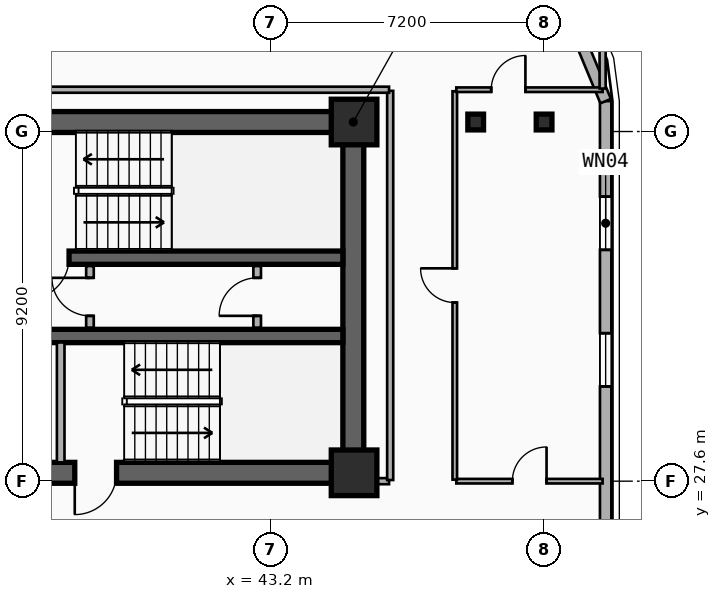
"""IFC4 building model, lengths in metres.
Left out: names, types, materials, properties, quantities, classifications, styles, units other than length and angle.
Written with IfcOpenShell. Run it as: python <this file> out.ifc"""

import sys

from ifc_helpers import new_model, si_unit, direction, frame, frame_2d, origin, origin_2d, place, context, subcontext, project, spatial, rectangle, i_section, extrude, element, fill, save


model = new_model("IFC4")
c1 = context("Model", 3, precision=1e-05, world=origin(), true_north=direction((0.0, 1.0)))
c2 = subcontext(c1, "Body", "Model", "MODEL_VIEW")
j1 = project(units=[si_unit("LENGTHUNIT", "METRE"), si_unit("PLANEANGLEUNIT", "RADIAN")], contexts=[c1])
p1 = place(None, origin())
s1 = spatial("IfcSite", under=j1, at=p1, CompositionType="ELEMENT")
p2 = place(p1, origin())
s2 = spatial("IfcBuilding", under=s1, at=p2, CompositionType="ELEMENT")
p3 = place(p2, frame((0.0, 0.0, 162.55)))
s3 = spatial("IfcBuildingStorey", under=s2, at=p3, CompositionType="ELEMENT", Elevation=162.55)
p4 = place(p3, frame((12.15, 37.05, 0.0), z_axis=(0.0, 0.0, 1.0), x_axis=(1.0, 0.0, 0.0)))
e1 = element("IfcWall", 1, at=p4, inside=s3, PredefinedType="SHEAR", context=c2, shape_type="SweptSolid", body=[
    extrude(rectangle(XDim=33.23, YDim=0.55, at=frame_2d((16.615, 0.0))), origin(), (0.0, 0.0, 1.0), 3.55),
])
p5 = place(p3, frame((45.38, 27.82, 0.0), z_axis=(0.0, 0.0, 1.0), x_axis=(-1.0, 0.0, 0.0)))
e2 = element("IfcWall", 2, at=p5, inside=s3, PredefinedType="SHEAR", context=c2, shape_type="SweptSolid", body=[
    extrude(rectangle(XDim=12.23, YDim=0.55, at=frame_2d((6.115, 0.0))), origin(), (0.0, 0.0, 1.0), 3.55),
])
p6 = place(p5, frame((9.93, 0.0, 0.0)))
e3 = element("IfcOpeningElement", 3, at=p6, cuts=e2, PredefinedType="OPENING", context=c2, shape_type="SweptSolid", body=[
    extrude(rectangle(XDim=1.1, YDim=2.15, at=frame_2d((0.55, 1.075))), frame((0.0, 0.285, 0.0), z_axis=(0.0, -1.0, 0.0), x_axis=(1.0, 0.0, 0.0)), (0.0, 0.0, 1.0), 0.57),
])
p7 = place(p5, frame((6.23, 0.0, 0.0)))
e4 = element("IfcOpeningElement", 4, at=p7, cuts=e2, PredefinedType="OPENING", context=c2, shape_type="SweptSolid", body=[
    extrude(rectangle(XDim=1.1, YDim=2.15, at=frame_2d((0.55, 1.075))), frame((0.0, 0.285, 0.0), z_axis=(0.0, -1.0, 0.0), x_axis=(1.0, 0.0, 0.0)), (0.0, 0.0, 1.0), 0.57),
])
p8 = place(p3, frame((45.38, 28.095, 0.0), z_axis=(0.0, 0.0, 1.0), x_axis=(0.0, 1.0, 0.0)))
e5 = element("IfcWall", 5, at=p8, inside=s3, PredefinedType="SHEAR", context=c2, shape_type="SweptSolid", body=[
    extrude(rectangle(XDim=8.68, YDim=0.55, at=frame_2d((4.34, 0.0))), origin(), (0.0, 0.0, 1.0), 3.55),
])
p9 = place(p3, frame((45.105, 33.48, 0.0), z_axis=(0.0, 0.0, 1.0), x_axis=(-1.0, 0.0, 0.0)))
e6 = element("IfcWall", 6, at=p9, inside=s3, PredefinedType="SHEAR", context=c2, shape_type="SweptSolid", body=[
    extrude(rectangle(XDim=8.55, YDim=0.35, at=frame_2d((4.275, 0.0))), origin(), (0.0, 0.0, 1.0), 3.55),
])
p10 = place(p9, frame((7.205, 0.0, 0.0)))
e7 = element("IfcOpeningElement", 7, at=p10, cuts=e6, PredefinedType="OPENING", context=c2, shape_type="SweptSolid", body=[
    extrude(rectangle(XDim=1.1, YDim=2.15, at=frame_2d((0.55, 1.075))), frame((0.0, 0.185, 0.0), z_axis=(0.0, -1.0, 0.0), x_axis=(1.0, 0.0, 0.0)), (0.0, 0.0, 1.0), 0.37),
])
p11 = place(p3, frame((36.555, 31.42, 0.0), z_axis=(0.0, 0.0, 1.0), x_axis=(1.0, 0.0, 0.0)))
e8 = element("IfcWall", 8, at=p11, inside=s3, PredefinedType="SHEAR", context=c2, shape_type="SweptSolid", body=[
    extrude(rectangle(XDim=8.55, YDim=0.35, at=frame_2d((4.275, 0.0))), origin(), (0.0, 0.0, 1.0), 3.55),
])
for number, where, z_axis, x_axis in (
    (9, (45.4, 27.82, 0.0), (0.0, 0.0, 1.0), (1.0, 0.0, 0.0)),
    (10, (45.4, 37.05, 0.0), (0.0, 0.0, 1.0), (1.0, 0.0, 0.0)),
):
    element("IfcColumn", number, at=place(p3, frame(where, z_axis=z_axis, x_axis=x_axis)), inside=s3, PredefinedType="COLUMN", context=c2, shape_type="SweptSolid", body=[
        extrude(rectangle(XDim=1.2, YDim=1.2, at=origin_2d()), origin(), (0.0, 0.0, 1.0), 3.55),
    ])
for number, where, z_axis, x_axis in (
    (11, (48.6, 37.05, 0.0), (0.0, 0.0, 1.0), (1.0, 0.0, 0.0)),
    (12, (50.4, 37.05, 0.0), (0.0, 0.0, 1.0), (1.0, 0.0, 0.0)),
):
    element("IfcColumn", number, at=place(p3, frame(where, z_axis=z_axis, x_axis=x_axis)), inside=s3, PredefinedType="COLUMN", context=c2, shape_type="SweptSolid", body=[
        extrude(i_section(OverallWidth=0.413, OverallDepth=0.415, WebThickness=0.03, FlangeThickness=0.047, FilletRadius=0.015, at=origin_2d()), origin(), (0.0, 0.0, 1.0), 3.55),
    ])
p12 = place(p3, frame((52.02, 37.6, 0.0), z_axis=(0.0, 0.0, 1.0), x_axis=(0.0, -1.0, 0.0)))
e13 = element("IfcWall", 13, at=p12, inside=s3, PredefinedType="SOLIDWALL", context=c2, shape_type="SweptSolid", body=[
    extrude(rectangle(XDim=23.0, YDim=0.3, at=frame_2d((11.5, 0.0))), origin(), (0.0, 0.0, 1.0), 3.29),
])
p13 = place(p12, frame((2.513, 0.0, 0.34)))
e14 = element("IfcOpeningElement", 14, at=p13, cuts=e13, PredefinedType="OPENING", context=c2, shape_type="SweptSolid", body=[
    extrude(rectangle(XDim=1.4, YDim=2.1, at=frame_2d((0.7, 1.05))), frame((0.0, 0.16, 0.0), z_axis=(0.0, -1.0, 0.0), x_axis=(1.0, 0.0, 0.0)), (0.0, 0.0, 1.0), 0.32),
])
p14 = place(p12, frame((6.107, 0.0, 0.34)))
e15 = element("IfcOpeningElement", 15, at=p14, cuts=e13, PredefinedType="OPENING", context=c2, shape_type="SweptSolid", body=[
    extrude(rectangle(XDim=1.4, YDim=2.1, at=frame_2d((0.7, 1.05))), frame((0.0, 0.16, 0.0), z_axis=(0.0, -1.0, 0.0), x_axis=(1.0, 0.0, 0.0)), (0.0, 0.0, 1.0), 0.32),
])
p15 = place(p12, frame((21.431, 0.0, 0.68)))
e16 = element("IfcOpeningElement", 16, at=p15, cuts=e13, PredefinedType="OPENING", context=c2, shape_type="SweptSolid", body=[
    extrude(rectangle(XDim=1.2, YDim=1.5, at=frame_2d((0.6, 0.75))), frame((0.0, 0.16, 0.0), z_axis=(0.0, -1.0, 0.0), x_axis=(1.0, 0.0, 0.0)), (0.0, 0.0, 1.0), 0.32),
])
p16 = place(p12, frame((17.073, 0.0, 0.34)))
e17 = element("IfcOpeningElement", 17, at=p16, cuts=e13, PredefinedType="OPENING", context=c2, shape_type="SweptSolid", body=[
    extrude(rectangle(XDim=1.4, YDim=2.1, at=frame_2d((0.7, 1.05))), frame((0.0, 0.16, 0.0), z_axis=(0.0, -1.0, 0.0), x_axis=(1.0, 0.0, 0.0)), (0.0, 0.0, 1.0), 0.32),
])
p17 = place(p12, frame((18.928, 0.0, 0.34)))
e18 = element("IfcOpeningElement", 18, at=p17, cuts=e13, PredefinedType="OPENING", context=c2, shape_type="SweptSolid", body=[
    extrude(rectangle(XDim=1.4, YDim=2.1, at=frame_2d((0.7, 1.05))), frame((0.0, 0.16, 0.0), z_axis=(0.0, -1.0, 0.0), x_axis=(1.0, 0.0, 0.0)), (0.0, 0.0, 1.0), 0.32),
])
p18 = place(p12, frame((13.484, 0.0, 0.34)))
e19 = element("IfcOpeningElement", 19, at=p18, cuts=e13, PredefinedType="OPENING", context=c2, shape_type="SweptSolid", body=[
    extrude(rectangle(XDim=1.4, YDim=2.1, at=frame_2d((0.7, 1.05))), frame((0.0, 0.16, 0.0), z_axis=(0.0, -1.0, 0.0), x_axis=(1.0, 0.0, 0.0)), (0.0, 0.0, 1.0), 0.32),
])
p19 = place(p3, frame((50.843, 40.443, 0.0), z_axis=(0.0, 0.0, 1.0), x_axis=(0.382704529509, -0.923870793506, 0.0)))
e20 = element("IfcWall", 20, at=p19, inside=s3, PredefinedType="SOLIDWALL", context=c2, shape_type="SweptSolid", body=[
    extrude(rectangle(XDim=3.077, YDim=0.3, at=frame_2d((1.538, 0.0))), origin(), (0.0, 0.0, 1.0), 3.29),
])
p20 = place(p3, frame((37.68, 28.095, 0.0), z_axis=(0.0, 0.0, 1.0), x_axis=(0.0, 1.0, 0.0)))
e21 = element("IfcWall", 21, at=p20, inside=s3, PredefinedType="PARTITIONING", context=c2, shape_type="SweptSolid", body=[
    extrude(rectangle(XDim=3.155, YDim=0.2, at=frame_2d((1.578, 0.0))), origin(), (0.0, 0.0, 1.0), 2.67),
])
p21 = place(p3, frame((38.45, 31.64, 0.0), z_axis=(0.0, 0.0, 1.0), x_axis=(0.0, 1.0, 0.0)))
e22 = element("IfcWall", 22, at=p21, inside=s3, PredefinedType="PARTITIONING", context=c2, shape_type="SweptSolid", body=[
    extrude(rectangle(XDim=1.62, YDim=0.2, at=frame_2d((0.81, 0.0))), origin(), (0.0, 0.0, 1.0), 3.29),
])
p22 = place(p21, frame((0.31, 0.0, 0.0)))
e23 = element("IfcOpeningElement", 23, at=p22, cuts=e22, PredefinedType="OPENING", context=c2, shape_type="SweptSolid", body=[
    extrude(rectangle(XDim=1.0, YDim=2.15, at=frame_2d((0.5, 1.075))), frame((0.0, 0.11, 0.0), z_axis=(0.0, -1.0, 0.0), x_axis=(1.0, 0.0, 0.0)), (0.0, 0.0, 1.0), 0.22),
])
p23 = place(p3, frame((42.85, 31.64, 0.0), z_axis=(0.0, 0.0, 1.0), x_axis=(0.0, 1.0, 0.0)))
e24 = element("IfcWall", 24, at=p23, inside=s3, PredefinedType="PARTITIONING", context=c2, shape_type="SweptSolid", body=[
    extrude(rectangle(XDim=1.62, YDim=0.2, at=frame_2d((0.81, 0.0))), origin(), (0.0, 0.0, 1.0), 3.29),
])
p24 = place(p23, frame((0.31, 0.0, 0.0)))
e25 = element("IfcOpeningElement", 25, at=p24, cuts=e24, PredefinedType="OPENING", context=c2, shape_type="SweptSolid", body=[
    extrude(rectangle(XDim=1.0, YDim=2.15, at=frame_2d((0.5, 1.075))), frame((0.0, 0.11, 0.0), z_axis=(0.0, -1.0, 0.0), x_axis=(1.0, 0.0, 0.0)), (0.0, 0.0, 1.0), 0.22),
])
p25 = place(p3, frame((48.09, 27.6, 0.0), z_axis=(0.0, 0.0, 1.0), x_axis=(1.0, 0.0, 0.0)))
e26 = element("IfcWall", 26, at=p25, inside=s3, PredefinedType="PARTITIONING", context=c2, shape_type="SweptSolid", body=[
    extrude(rectangle(XDim=3.85, YDim=0.12, at=frame_2d((1.925, 0.0))), origin(), (0.0, 0.0, 1.0), 2.62),
])
p26 = place(p25, frame((1.475, 0.0, 0.0)))
e27 = element("IfcOpeningElement", 27, at=p26, cuts=e26, PredefinedType="OPENING", context=c2, shape_type="SweptSolid", body=[
    extrude(rectangle(XDim=0.9, YDim=2.1, at=frame_2d((0.45, 1.05))), frame((0.0, 0.07, 0.0), z_axis=(0.0, -1.0, 0.0), x_axis=(1.0, 0.0, 0.0)), (0.0, 0.0, 1.0), 0.14),
])
p27 = place(p3, frame((48.05, 27.64, 0.0), z_axis=(0.0, 0.0, 1.0), x_axis=(0.0, 1.0, 0.0)))
e28 = element("IfcWall", 28, at=p27, inside=s3, PredefinedType="PARTITIONING", context=c2, shape_type="SweptSolid", body=[
    extrude(rectangle(XDim=10.22, YDim=0.12, at=frame_2d((5.11, 0.0))), origin(), (0.0, 0.0, 1.0), 2.77),
])
p28 = place(p27, frame((4.66, 0.0, 0.0)))
e29 = element("IfcOpeningElement", 29, at=p28, cuts=e28, PredefinedType="OPENING", context=c2, shape_type="SweptSolid", body=[
    extrude(rectangle(XDim=0.9, YDim=2.1, at=frame_2d((0.45, 1.05))), frame((0.0, 0.07, 0.0), z_axis=(0.0, -1.0, 0.0), x_axis=(1.0, 0.0, 0.0)), (0.0, 0.0, 1.0), 0.14),
])
p29 = place(p3, frame((48.09, 37.9, 0.0), z_axis=(0.0, 0.0, 1.0), x_axis=(1.0, 0.0, 0.0)))
e30 = element("IfcWall", 30, at=p29, inside=s3, PredefinedType="PARTITIONING", context=c2, shape_type="SweptSolid", body=[
    extrude(rectangle(XDim=3.85, YDim=0.12, at=frame_2d((1.925, 0.0))), origin(), (0.0, 0.0, 1.0), 3.29),
])
p30 = place(p29, frame((0.919, 0.0, 0.0)))
e31 = element("IfcOpeningElement", 31, at=p30, cuts=e30, PredefinedType="OPENING", context=c2, shape_type="SweptSolid", body=[
    extrude(rectangle(XDim=0.9, YDim=2.1, at=frame_2d((0.45, 1.05))), frame((0.0, 0.07, 0.0), z_axis=(0.0, -1.0, 0.0), x_axis=(1.0, 0.0, 0.0)), (0.0, 0.0, 1.0), 0.14),
])
p31 = place(p3, frame((45.41, 27.6, 0.0), z_axis=(0.0, 0.0, 1.0), x_axis=(1.0, 0.0, 0.0)))
e32 = element("IfcWall", 32, at=p31, inside=s3, PredefinedType="PARTITIONING", context=c2, shape_type="SweptSolid", body=[
    extrude(rectangle(XDim=0.91, YDim=0.16, at=frame_2d((0.455, 0.0))), origin(), (0.0, 0.0, 1.0), 2.36),
])
p32 = place(p3, frame((46.35, 27.63, 0.0), z_axis=(0.0, 0.0, 1.0), x_axis=(0.0, 1.0, 0.0)))
e33 = element("IfcWall", 33, at=p32, inside=s3, PredefinedType="PARTITIONING", context=c2, shape_type="SweptSolid", body=[
    extrude(rectangle(XDim=10.24, YDim=0.16, at=frame_2d((5.12, 0.0))), origin(), (0.0, 0.0, 1.0), 2.77),
])
p33 = place(p3, frame((11.28, 37.9, 0.0), z_axis=(0.0, 0.0, 1.0), x_axis=(1.0, 0.0, 0.0)))
e34 = element("IfcWall", 34, at=p33, inside=s3, PredefinedType="PARTITIONING", context=c2, shape_type="SweptSolid", body=[
    extrude(rectangle(XDim=35.04, YDim=0.16, at=frame_2d((17.52, 0.0))), origin(), (0.0, 0.0, 1.0), 3.29),
])
p34 = place(p3, frame((51.94, 37.93, 0.0), z_axis=(0.0, 0.0, 1.0), x_axis=(0.0, 1.0, 0.0)))
e35 = element("IfcWall", 35, at=p34, inside=s3, PredefinedType="PARTITIONING", context=c2, shape_type="SweptSolid", body=[
    extrude(rectangle(XDim=1.44, YDim=0.16, at=frame_2d((0.72, 0.0))), origin(), (0.0, 0.0, 1.0), 3.29),
])
p35 = place(p13, origin())
e36 = element("IfcWindow", 36, at=p35, inside=s3, PartitioningType="SINGLE_PANEL", PredefinedType="WINDOW", context=c2, shape_type="SweptSolid", body=[
    extrude(rectangle(XDim=1.4, YDim=2.1, at=frame_2d((0.7, 1.05))), frame((0.0, 0.03, 0.0), z_axis=(0.0, -1.0, 0.0), x_axis=(1.0, 0.0, 0.0)), (0.0, 0.0, 1.0), 0.06),
])
fill(e14, e36)
p36 = place(p14, origin())
e37 = element("IfcWindow", 37, at=p36, inside=s3, PartitioningType="SINGLE_PANEL", PredefinedType="WINDOW", context=c2, shape_type="SweptSolid", body=[
    extrude(rectangle(XDim=1.4, YDim=2.1, at=frame_2d((0.7, 1.05))), frame((0.0, 0.03, 0.0), z_axis=(0.0, -1.0, 0.0), x_axis=(1.0, 0.0, 0.0)), (0.0, 0.0, 1.0), 0.06),
])
fill(e15, e37)
p37 = place(p10, origin())
e38 = element("IfcDoor", 38, at=p37, inside=s3, OperationType="SINGLE_SWING_RIGHT", PredefinedType="DOOR", context=c2, shape_type="SweptSolid", body=[
    extrude(rectangle(XDim=1.1, YDim=2.15, at=frame_2d((0.55, 1.075))), frame((0.0, 0.025, 0.0), z_axis=(0.0, -1.0, 0.0), x_axis=(1.0, 0.0, 0.0)), (0.0, 0.0, 1.0), 0.05),
])
fill(e7, e38)
p38 = place(p7, origin())
e39 = element("IfcDoor", 39, at=p38, inside=s3, OperationType="SINGLE_SWING_RIGHT", PredefinedType="DOOR", context=c2, shape_type="SweptSolid", body=[
    extrude(rectangle(XDim=1.1, YDim=2.15, at=frame_2d((0.55, 1.075))), frame((0.0, 0.025, 0.0), z_axis=(0.0, -1.0, 0.0), x_axis=(1.0, 0.0, 0.0)), (0.0, 0.0, 1.0), 0.05),
])
fill(e4, e39)
p39 = place(p22, origin())
e40 = element("IfcDoor", 40, at=p39, inside=s3, OperationType="SINGLE_SWING_RIGHT", PredefinedType="DOOR", context=c2, shape_type="SweptSolid", body=[
    extrude(rectangle(XDim=1.0, YDim=2.15, at=frame_2d((0.5, 1.075))), frame((0.0, 0.025, 0.0), z_axis=(0.0, -1.0, 0.0), x_axis=(1.0, 0.0, 0.0)), (0.0, 0.0, 1.0), 0.05),
])
fill(e23, e40)
p40 = place(p24, origin())
e41 = element("IfcDoor", 41, at=p40, inside=s3, OperationType="SINGLE_SWING_LEFT", PredefinedType="DOOR", context=c2, shape_type="SweptSolid", body=[
    extrude(rectangle(XDim=1.0, YDim=2.15, at=frame_2d((0.5, 1.075))), frame((0.0, 0.025, 0.0), z_axis=(0.0, -1.0, 0.0), x_axis=(1.0, 0.0, 0.0)), (0.0, 0.0, 1.0), 0.05),
])
fill(e25, e41)
p41 = place(p26, origin())
e42 = element("IfcDoor", 42, at=p41, inside=s3, OperationType="SINGLE_SWING_RIGHT", PredefinedType="DOOR", context=c2, shape_type="SweptSolid", body=[
    extrude(rectangle(XDim=0.9, YDim=2.1, at=frame_2d((0.45, 1.05))), frame((0.0, 0.025, 0.0), z_axis=(0.0, -1.0, 0.0), x_axis=(1.0, 0.0, 0.0)), (0.0, 0.0, 1.0), 0.05),
])
fill(e27, e42)
p42 = place(p28, origin())
e43 = element("IfcDoor", 43, at=p42, inside=s3, OperationType="SINGLE_SWING_RIGHT", PredefinedType="DOOR", context=c2, shape_type="SweptSolid", body=[
    extrude(rectangle(XDim=0.9, YDim=2.1, at=frame_2d((0.45, 1.05))), frame((0.0, 0.025, 0.0), z_axis=(0.0, -1.0, 0.0), x_axis=(1.0, 0.0, 0.0)), (0.0, 0.0, 1.0), 0.05),
])
fill(e29, e43)
p43 = place(p30, origin())
e44 = element("IfcDoor", 44, at=p43, inside=s3, OperationType="SINGLE_SWING_RIGHT", PredefinedType="DOOR", context=c2, shape_type="SweptSolid", body=[
    extrude(rectangle(XDim=0.9, YDim=2.1, at=frame_2d((0.45, 1.05))), frame((0.0, 0.025, 0.0), z_axis=(0.0, -1.0, 0.0), x_axis=(1.0, 0.0, 0.0)), (0.0, 0.0, 1.0), 0.05),
])
fill(e31, e44)
save(model, sys.argv[1])
